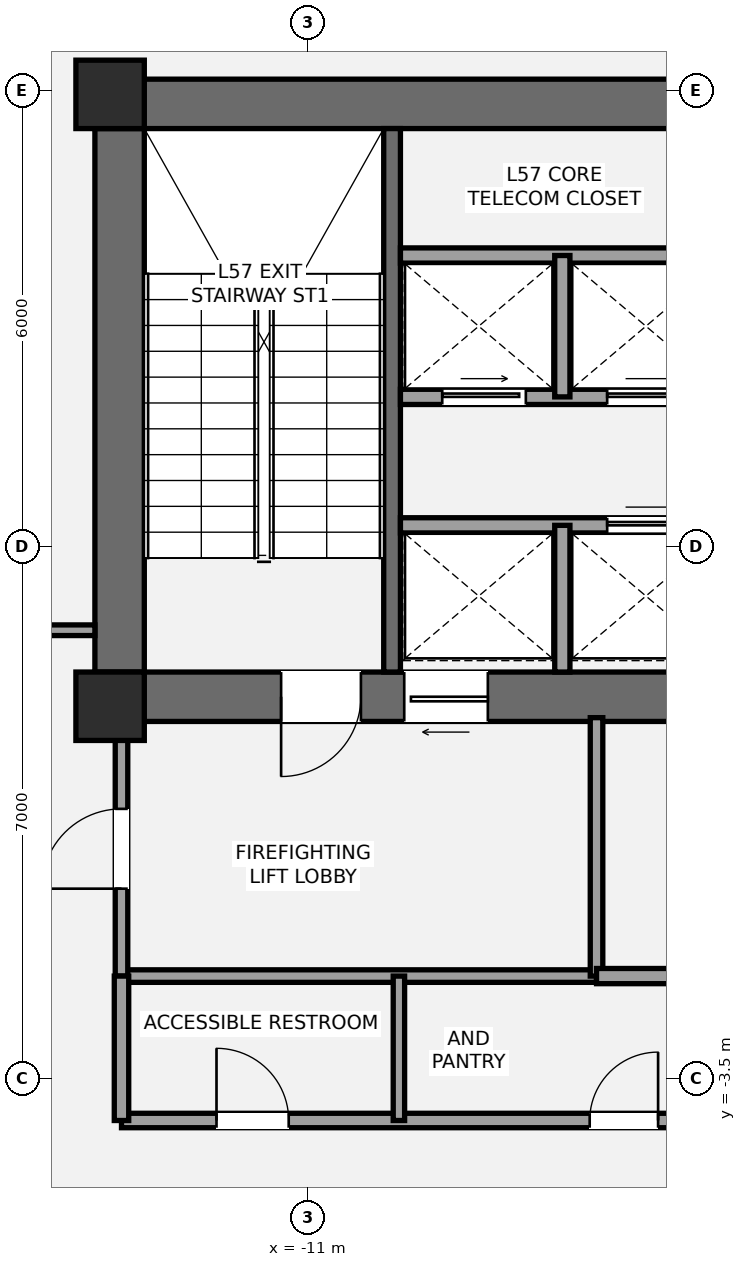
"""IFC4 building model, lengths in metres.
Left out: names, types, materials, properties, quantities, classifications, styles, units other than length and angle.
Written with IfcOpenShell. Run it as: python <this file> out.ifc"""

import sys

from ifc_helpers import new_model, si_unit, direction, frame, frame_2d, origin, origin_2d, place, context, subcontext, project, spatial, rectangle, extrude, element, fill, save


model = new_model("IFC4")
c1 = context("Model", 3, precision=1e-05, world=origin(), true_north=direction((0.0, 1.0)))
c2 = subcontext(c1, "Body", "Model", "MODEL_VIEW")
j1 = project(units=[si_unit("LENGTHUNIT", "METRE"), si_unit("PLANEANGLEUNIT", "RADIAN")], contexts=[c1])
p1 = place(None, origin())
s1 = spatial("IfcSite", under=j1, at=p1, CompositionType="ELEMENT")
p2 = place(p1, origin())
s2 = spatial("IfcBuilding", under=s1, at=p2, CompositionType="ELEMENT")
p3 = place(p2, frame((0.0, 0.0, 205.9)))
s3 = spatial("IfcBuildingStorey", under=s2, at=p3, CompositionType="ELEMENT", Elevation=205.9)
p4 = place(p3, frame((-13.475, 1.2, 0.0), z_axis=(0.0, 0.0, 1.0), x_axis=(0.0, 1.0, 0.0)))
e1 = element("IfcWall", 1, at=p4, inside=s3, PredefinedType="SHEAR", context=c2, shape_type="SweptSolid", body=[
    extrude(rectangle(XDim=8.45, YDim=0.65, at=frame_2d((4.225, 0.0))), origin(), (0.0, 0.0, 1.0), 4.1),
])
p5 = place(p3, frame((-13.8, 9.325, 0.0), z_axis=(0.0, 0.0, 1.0), x_axis=(1.0, 0.0, 0.0)))
e2 = element("IfcWall", 2, at=p5, inside=s3, PredefinedType="SHEAR", context=c2, shape_type="SweptSolid", body=[
    extrude(rectangle(XDim=9.325, YDim=0.65, at=frame_2d((4.663, 0.0))), origin(), (0.0, 0.0, 1.0), 4.1),
])
p6 = place(p3, frame((-4.875, 1.525, 0.0), z_axis=(0.0, 0.0, 1.0), x_axis=(-1.0, 0.0, 0.0)))
e3 = element("IfcWall", 3, at=p6, inside=s3, PredefinedType="SHEAR", context=c2, shape_type="SweptSolid", body=[
    extrude(rectangle(XDim=8.925, YDim=0.65, at=frame_2d((4.462, 0.0))), origin(), (0.0, 0.0, 1.0), 4.1),
])
p7 = place(p6, frame((5.425, 0.0, 0.0)))
e4 = element("IfcOpeningElement", 4, at=p7, cuts=e3, PredefinedType="OPENING", context=c2, shape_type="SweptSolid", body=[
    extrude(rectangle(XDim=1.05, YDim=2.15, at=frame_2d((0.525, 1.075))), frame((0.0, 0.335, 0.0), z_axis=(0.0, -1.0, 0.0), x_axis=(1.0, 0.0, 0.0)), (0.0, 0.0, 1.0), 0.67),
])
p8 = place(p6, frame((3.755, 0.0, 0.0)))
e5 = element("IfcOpeningElement", 5, at=p8, cuts=e3, PredefinedType="OPENING", context=c2, shape_type="SweptSolid", body=[
    extrude(rectangle(XDim=1.1, YDim=2.2, at=frame_2d((0.55, 1.1))), frame((0.0, 0.335, 0.0), z_axis=(0.0, -1.0, 0.0), x_axis=(1.0, 0.0, 0.0)), (0.0, 0.0, 1.0), 0.67),
])
p9 = place(p3, frame((-9.89, 1.85, 0.0), z_axis=(0.0, 0.0, 1.0), x_axis=(0.0, 1.0, 0.0)))
e6 = element("IfcWall", 6, at=p9, inside=s3, PredefinedType="SHEAR", context=c2, shape_type="SweptSolid", body=[
    extrude(rectangle(XDim=7.15, YDim=0.22, at=frame_2d((3.575, 0.0))), origin(), (0.0, 0.0, 1.0), 4.1),
])
for number, where, z_axis, x_axis in (
    (7, (-13.6, 1.4, 0.0), (0.0, 0.0, 1.0), (1.0, 0.0, 0.0)),
    (8, (-13.6, 9.45, 0.0), (0.0, 0.0, 1.0), (1.0, 0.0, 0.0)),
):
    element("IfcColumn", number, at=place(p3, frame(where, z_axis=z_axis, x_axis=x_axis)), inside=s3, PredefinedType="COLUMN", context=c2, shape_type="SweptSolid", body=[
        extrude(rectangle(XDim=0.9, YDim=0.9, at=origin_2d()), origin(), (0.0, 0.0, 1.0), 4.1),
    ])
p10 = place(p3, frame((-13.45, -2.15, 0.0), z_axis=(0.0, 0.0, 1.0), x_axis=(1.0, 0.0, 0.0)))
e9 = element("IfcWall", 9, at=p10, inside=s3, PredefinedType="PARTITIONING", context=c2, shape_type="SweptSolid", body=[
    extrude(rectangle(XDim=6.25, YDim=0.165, at=frame_2d((3.125, 0.0))), origin(), (0.0, 0.0, 1.0), 3.373),
])
p11 = place(p3, frame((-13.45, -2.15, 0.0), z_axis=(0.0, 0.0, 1.0), x_axis=(0.0, 1.0, 0.0)))
e10 = element("IfcWall", 10, at=p11, inside=s3, PredefinedType="PARTITIONING", context=c2, shape_type="SweptSolid", body=[
    extrude(rectangle(XDim=3.4, YDim=0.165, at=frame_2d((1.7, 0.0))), origin(), (0.0, 0.0, 1.0), 3.373),
])
p12 = place(p11, frame((1.15, 0.0, 0.0)))
e11 = element("IfcOpeningElement", 11, at=p12, cuts=e10, PredefinedType="OPENING", context=c2, shape_type="SweptSolid", body=[
    extrude(rectangle(XDim=1.05, YDim=2.15, at=frame_2d((0.525, 1.075))), frame((0.0, 0.093, 0.0), z_axis=(0.0, -1.0, 0.0), x_axis=(1.0, 0.0, 0.0)), (0.0, 0.0, 1.0), 0.185),
])
p13 = place(p3, frame((-7.2, -2.15, 0.0), z_axis=(0.0, 0.0, 1.0), x_axis=(0.0, 1.0, 0.0)))
e12 = element("IfcWall", 12, at=p13, inside=s3, PredefinedType="PARTITIONING", context=c2, shape_type="SweptSolid", body=[
    extrude(rectangle(XDim=3.4, YDim=0.165, at=frame_2d((1.7, 0.0))), origin(), (0.0, 0.0, 1.0), 3.373),
])
p14 = place(p3, frame((-7.2, -2.15, 0.0), z_axis=(0.0, 0.0, 1.0), x_axis=(1.0, 0.0, 0.0)))
e13 = element("IfcWall", 13, at=p14, inside=s3, PredefinedType="SOLIDWALL", context=c2, shape_type="SweptSolid", body=[
    extrude(rectangle(XDim=2.25, YDim=0.2, at=frame_2d((1.125, 0.0))), origin(), (0.0, 0.0, 1.0), 3.373),
])
p15 = place(p3, frame((-9.78, 3.78, 0.0), z_axis=(0.0, 0.0, 1.0), x_axis=(1.0, 0.0, 0.0)))
e14 = element("IfcWall", 14, at=p15, inside=s3, PredefinedType="SOLIDWALL", context=c2, shape_type="SweptSolid", body=[
    extrude(rectangle(XDim=4.255, YDim=0.2, at=frame_2d((2.127, 0.0))), origin(), (0.0, 0.0, 1.0), 3.92),
])
p16 = place(p15, frame((2.72, 0.0, 0.0)))
e15 = element("IfcOpeningElement", 15, at=p16, cuts=e14, PredefinedType="OPENING", context=c2, shape_type="SweptSolid", body=[
    extrude(rectangle(XDim=1.1, YDim=2.2, at=frame_2d((0.55, 1.1))), frame((0.0, 0.11, 0.0), z_axis=(0.0, -1.0, 0.0), x_axis=(1.0, 0.0, 0.0)), (0.0, 0.0, 1.0), 0.22),
])
p17 = place(p3, frame((-7.65, 1.85, 0.0), z_axis=(0.0, 0.0, 1.0), x_axis=(0.0, 1.0, 0.0)))
e16 = element("IfcWall", 16, at=p17, inside=s3, PredefinedType="SOLIDWALL", context=c2, shape_type="SweptSolid", body=[
    extrude(rectangle(XDim=1.93, YDim=0.2, at=frame_2d((0.965, 0.0))), origin(), (0.0, 0.0, 1.0), 3.92),
])
p18 = place(p3, frame((-9.78, 5.47, 0.0), z_axis=(0.0, 0.0, 1.0), x_axis=(1.0, 0.0, 0.0)))
e17 = element("IfcWall", 17, at=p18, inside=s3, PredefinedType="SOLIDWALL", context=c2, shape_type="SweptSolid", body=[
    extrude(rectangle(XDim=4.255, YDim=0.2, at=frame_2d((2.127, 0.0))), origin(), (0.0, 0.0, 1.0), 3.92),
])
p19 = place(p18, frame((0.55, 0.0, 0.0)))
e18 = element("IfcOpeningElement", 18, at=p19, cuts=e17, PredefinedType="OPENING", context=c2, shape_type="SweptSolid", body=[
    extrude(rectangle(XDim=1.1, YDim=2.2, at=frame_2d((0.55, 1.1))), frame((0.0, 0.11, 0.0), z_axis=(0.0, -1.0, 0.0), x_axis=(1.0, 0.0, 0.0)), (0.0, 0.0, 1.0), 0.22),
])
p20 = place(p18, frame((2.72, 0.0, 0.0)))
e19 = element("IfcOpeningElement", 19, at=p20, cuts=e17, PredefinedType="OPENING", context=c2, shape_type="SweptSolid", body=[
    extrude(rectangle(XDim=1.1, YDim=2.2, at=frame_2d((0.55, 1.1))), frame((0.0, 0.11, 0.0), z_axis=(0.0, -1.0, 0.0), x_axis=(1.0, 0.0, 0.0)), (0.0, 0.0, 1.0), 0.22),
])
p21 = place(p3, frame((-9.78, 7.33, 0.0), z_axis=(0.0, 0.0, 1.0), x_axis=(1.0, 0.0, 0.0)))
e20 = element("IfcWall", 20, at=p21, inside=s3, PredefinedType="SOLIDWALL", context=c2, shape_type="SweptSolid", body=[
    extrude(rectangle(XDim=4.255, YDim=0.2, at=frame_2d((2.127, 0.0))), origin(), (0.0, 0.0, 1.0), 3.92),
])
p22 = place(p3, frame((-7.65, 5.47, 0.0), z_axis=(0.0, 0.0, 1.0), x_axis=(0.0, 1.0, 0.0)))
e21 = element("IfcWall", 21, at=p22, inside=s3, PredefinedType="SOLIDWALL", context=c2, shape_type="SweptSolid", body=[
    extrude(rectangle(XDim=1.86, YDim=0.2, at=frame_2d((0.93, 0.0))), origin(), (0.0, 0.0, 1.0), 3.92),
])
p23 = place(p3, frame((-13.45, -4.05, 0.0), z_axis=(0.0, 0.0, 1.0), x_axis=(1.0, 0.0, 0.0)))
e22 = element("IfcWall", 22, at=p23, inside=s3, PredefinedType="PLUMBINGWALL", context=c2, shape_type="SweptSolid", body=[
    extrude(rectangle(XDim=11.35, YDim=0.19, at=frame_2d((5.675, 0.0))), origin(), (0.0, 0.0, 1.0), 3.307),
])
p24 = place(p23, frame((1.25, 0.0, 0.0)))
e23 = element("IfcOpeningElement", 23, at=p24, cuts=e22, PredefinedType="OPENING", context=c2, shape_type="SweptSolid", body=[
    extrude(rectangle(XDim=0.95, YDim=2.15, at=frame_2d((0.475, 1.075))), frame((0.0, 0.105, 0.0), z_axis=(0.0, -1.0, 0.0), x_axis=(1.0, 0.0, 0.0)), (0.0, 0.0, 1.0), 0.21),
])
p25 = place(p23, frame((6.16, 0.0, 0.0)))
e24 = element("IfcOpeningElement", 24, at=p25, cuts=e22, PredefinedType="OPENING", context=c2, shape_type="SweptSolid", body=[
    extrude(rectangle(XDim=0.9, YDim=2.1, at=frame_2d((0.45, 1.05))), frame((0.0, 0.105, 0.0), z_axis=(0.0, -1.0, 0.0), x_axis=(1.0, 0.0, 0.0)), (0.0, 0.0, 1.0), 0.21),
])
p26 = place(p3, frame((-13.45, -4.05, 0.0), z_axis=(0.0, 0.0, 1.0), x_axis=(0.0, 1.0, 0.0)))
e25 = element("IfcWall", 25, at=p26, inside=s3, PredefinedType="PLUMBINGWALL", context=c2, shape_type="SweptSolid", body=[
    extrude(rectangle(XDim=1.9, YDim=0.19, at=frame_2d((0.95, 0.0))), origin(), (0.0, 0.0, 1.0), 3.373),
])
p27 = place(p3, frame((-9.8, -4.05, 0.0), z_axis=(0.0, 0.0, 1.0), x_axis=(0.0, 1.0, 0.0)))
e26 = element("IfcWall", 26, at=p27, inside=s3, PredefinedType="PLUMBINGWALL", context=c2, shape_type="SweptSolid", body=[
    extrude(rectangle(XDim=1.9, YDim=0.15, at=frame_2d((0.95, 0.0))), origin(), (0.0, 0.0, 1.0), 3.92),
])
p28 = place(p3, frame((-15.7, 2.4, 0.0), z_axis=(0.0, 0.0, 1.0), x_axis=(1.0, 0.0, 0.0)))
e27 = element("IfcWall", 27, at=p28, inside=s3, PredefinedType="PARTITIONING", context=c2, shape_type="SweptSolid", body=[
    extrude(rectangle(XDim=1.9, YDim=0.14, at=frame_2d((0.95, 0.0))), origin(), (0.0, 0.0, 1.0), 3.373),
])
p29 = place(p28, frame((0.32, 0.0, 0.0)))
e28 = element("IfcOpeningElement", 28, at=p29, cuts=e27, PredefinedType="OPENING", context=c2, shape_type="SweptSolid", body=[
    extrude(rectangle(XDim=0.92, YDim=2.15, at=frame_2d((0.46, 1.075))), frame((0.0, 0.08, 0.0), z_axis=(0.0, -1.0, 0.0), x_axis=(1.0, 0.0, 0.0)), (0.0, 0.0, 1.0), 0.16),
])
p30 = place(p7, origin())
e29 = element("IfcDoor", 29, at=p30, inside=s3, OperationType="SINGLE_SWING_RIGHT", PredefinedType="DOOR", context=c2, shape_type="SweptSolid", body=[
    extrude(rectangle(XDim=1.05, YDim=2.15, at=frame_2d((0.525, 1.075))), frame((0.0, 0.025, 0.0), z_axis=(0.0, -1.0, 0.0), x_axis=(1.0, 0.0, 0.0)), (0.0, 0.0, 1.0), 0.05),
])
fill(e4, e29)
p31 = place(p12, origin())
e30 = element("IfcDoor", 30, at=p31, inside=s3, OperationType="SINGLE_SWING_LEFT", PredefinedType="DOOR", context=c2, shape_type="SweptSolid", body=[
    extrude(rectangle(XDim=1.05, YDim=2.15, at=frame_2d((0.525, 1.075))), frame((0.0, 0.025, 0.0), z_axis=(0.0, -1.0, 0.0), x_axis=(1.0, 0.0, 0.0)), (0.0, 0.0, 1.0), 0.05),
])
fill(e11, e30)
p32 = place(p8, origin())
e31 = element("IfcDoor", 31, at=p32, inside=s3, OperationType="SLIDING_TO_LEFT", PredefinedType="DOOR", context=c2, shape_type="SweptSolid", body=[
    extrude(rectangle(XDim=1.1, YDim=2.2, at=frame_2d((0.55, 1.1))), frame((0.0, 0.025, 0.0), z_axis=(0.0, -1.0, 0.0), x_axis=(1.0, 0.0, 0.0)), (0.0, 0.0, 1.0), 0.05),
])
fill(e5, e31)
p33 = place(p19, origin())
e32 = element("IfcDoor", 32, at=p33, inside=s3, OperationType="SLIDING_TO_LEFT", PredefinedType="DOOR", context=c2, shape_type="SweptSolid", body=[
    extrude(rectangle(XDim=1.1, YDim=2.2, at=frame_2d((0.55, 1.1))), frame((0.0, 0.025, 0.0), z_axis=(0.0, -1.0, 0.0), x_axis=(1.0, 0.0, 0.0)), (0.0, 0.0, 1.0), 0.05),
])
fill(e18, e32)
p34 = place(p20, origin())
e33 = element("IfcDoor", 33, at=p34, inside=s3, OperationType="SLIDING_TO_LEFT", PredefinedType="DOOR", context=c2, shape_type="SweptSolid", body=[
    extrude(rectangle(XDim=1.1, YDim=2.2, at=frame_2d((0.55, 1.1))), frame((0.0, 0.025, 0.0), z_axis=(0.0, -1.0, 0.0), x_axis=(1.0, 0.0, 0.0)), (0.0, 0.0, 1.0), 0.05),
])
fill(e19, e33)
p35 = place(p16, origin())
e34 = element("IfcDoor", 34, at=p35, inside=s3, OperationType="SLIDING_TO_LEFT", PredefinedType="DOOR", context=c2, shape_type="SweptSolid", body=[
    extrude(rectangle(XDim=1.1, YDim=2.2, at=frame_2d((0.55, 1.1))), frame((0.0, 0.025, 0.0), z_axis=(0.0, -1.0, 0.0), x_axis=(1.0, 0.0, 0.0)), (0.0, 0.0, 1.0), 0.05),
])
fill(e15, e34)
p36 = place(p24, origin())
e35 = element("IfcDoor", 35, at=p36, inside=s3, OperationType="SINGLE_SWING_LEFT", PredefinedType="DOOR", context=c2, shape_type="SweptSolid", body=[
    extrude(rectangle(XDim=0.95, YDim=2.15, at=frame_2d((0.475, 1.075))), frame((0.0, 0.025, 0.0), z_axis=(0.0, -1.0, 0.0), x_axis=(1.0, 0.0, 0.0)), (0.0, 0.0, 1.0), 0.05),
])
fill(e23, e35)
p37 = place(p25, origin())
e36 = element("IfcDoor", 36, at=p37, inside=s3, OperationType="SINGLE_SWING_RIGHT", PredefinedType="DOOR", context=c2, shape_type="SweptSolid", body=[
    extrude(rectangle(XDim=0.9, YDim=2.1, at=frame_2d((0.45, 1.05))), frame((0.0, 0.025, 0.0), z_axis=(0.0, -1.0, 0.0), x_axis=(1.0, 0.0, 0.0)), (0.0, 0.0, 1.0), 0.05),
])
fill(e24, e36)
save(model, sys.argv[1])
